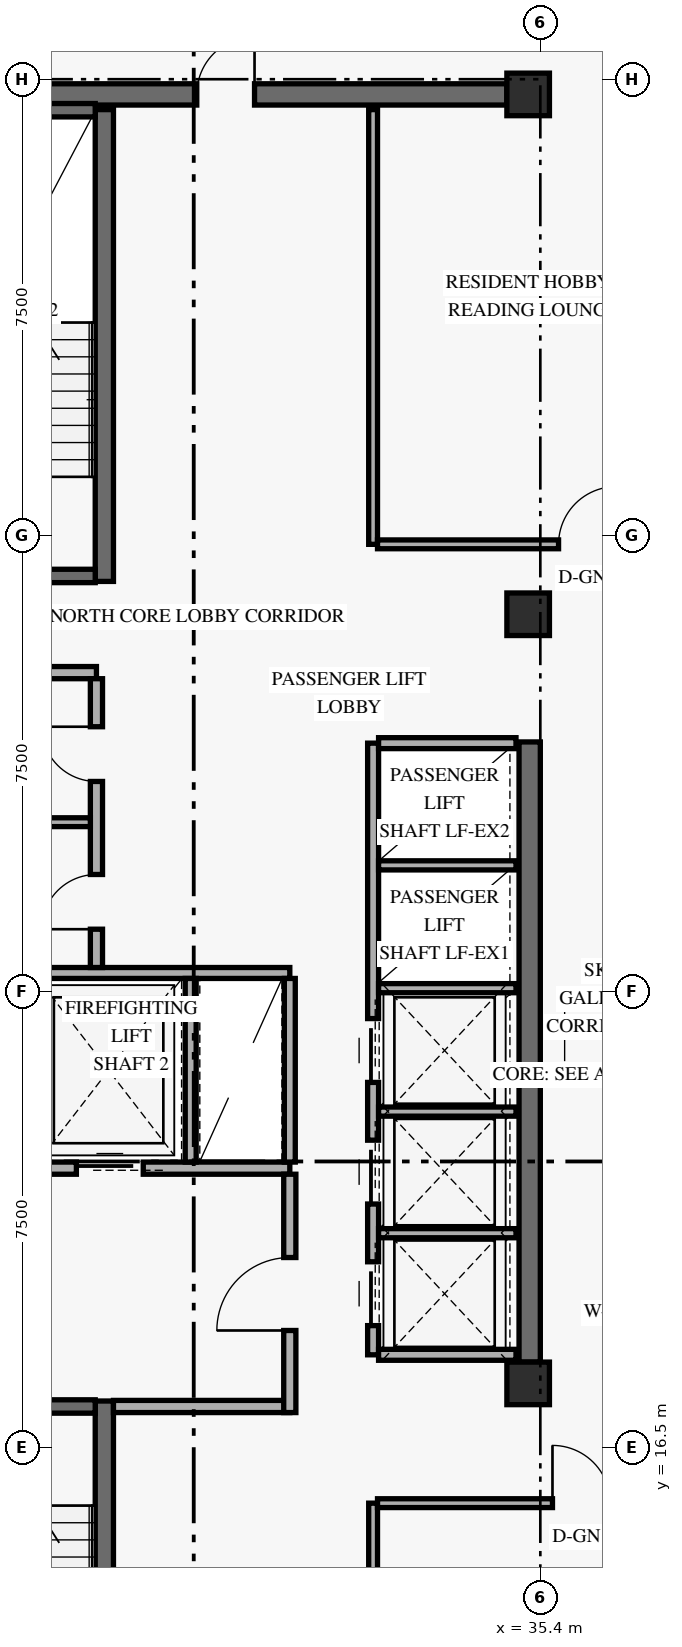
"""IFC4 building model, lengths in metres.
Left out: names, types, materials, properties, quantities, classifications, styles, units other than length and angle.
Written with IfcOpenShell. Run it as: python <this file> out.ifc"""

import sys

from ifc_helpers import new_model, si_unit, direction, frame, frame_2d, origin, origin_2d, place, context, subcontext, project, spatial, rectangle, extrude, element, fill, save


model = new_model("IFC4")
c1 = context("Model", 3, precision=1e-05, world=origin(), true_north=direction((0.0, 1.0)))
c2 = subcontext(c1, "Body", "Model", "MODEL_VIEW")
j1 = project(units=[si_unit("LENGTHUNIT", "METRE"), si_unit("PLANEANGLEUNIT", "RADIAN")], contexts=[c1])
p1 = place(None, origin())
s1 = spatial("IfcSite", under=j1, at=p1, CompositionType="ELEMENT")
p2 = place(p1, origin())
s2 = spatial("IfcBuilding", under=s1, at=p2, CompositionType="ELEMENT")
p3 = place(p2, frame((0.0, 0.0, 274.8)))
s3 = spatial("IfcBuildingStorey", under=s2, at=p3, CompositionType="ELEMENT", Elevation=274.8)
p4 = place(p3, frame((35.225, 17.9, 0.0), z_axis=(0.0, 0.0, 1.0), x_axis=(0.0, 1.0, 0.0)))
e1 = element("IfcWall", 1, at=p4, inside=s3, PredefinedType="SHEAR", context=c2, shape_type="SweptSolid", body=[
    extrude(rectangle(XDim=10.2, YDim=0.35, at=frame_2d((5.1, 0.0))), origin(), (0.0, 0.0, 1.0), 2.821),
])
p5 = place(p3, frame((24.55, 38.75, 0.0), z_axis=(0.0, 0.0, 1.0), x_axis=(1.0, 0.0, 0.0)))
e2 = element("IfcWall", 2, at=p5, inside=s3, PredefinedType="SHEAR", context=c2, shape_type="SweptSolid", body=[
    extrude(rectangle(XDim=10.3, YDim=0.35, at=frame_2d((5.15, 0.0))), origin(), (0.0, 0.0, 1.0), 3.36),
])
p6 = place(p5, frame((5.2, 0.0, 0.0)))
e3 = element("IfcOpeningElement", 3, at=p6, cuts=e2, PredefinedType="OPENING", context=c2, shape_type="SweptSolid", body=[
    extrude(rectangle(XDim=0.95, YDim=2.15, at=frame_2d((0.475, 1.075))), frame((0.0, 0.185, 0.0), z_axis=(0.0, -1.0, 0.0), x_axis=(1.0, 0.0, 0.0)), (0.0, 0.0, 1.0), 0.37),
])
p7 = place(p3, frame((28.23, 9.5, 0.0), z_axis=(0.0, 0.0, 1.0), x_axis=(0.0, 1.0, 0.0)))
e4 = element("IfcWall", 4, at=p7, inside=s3, PredefinedType="SHEAR", context=c2, shape_type="SweptSolid", body=[
    extrude(rectangle(XDim=7.76, YDim=0.3, at=frame_2d((3.88, 0.0))), origin(), (0.0, 0.0, 1.0), 3.36),
])
p8 = place(p3, frame((24.92, 17.17, 0.0), z_axis=(0.0, 0.0, 1.0), x_axis=(1.0, 0.0, 0.0)))
e5 = element("IfcWall", 5, at=p8, inside=s3, PredefinedType="SHEAR", context=c2, shape_type="SweptSolid", body=[
    extrude(rectangle(XDim=3.16, YDim=0.22, at=frame_2d((1.58, 0.0))), origin(), (0.0, 0.0, 1.0), 3.36),
])
p9 = place(p8, frame((0.78, 0.0, 0.0)))
e6 = element("IfcOpeningElement", 6, at=p9, cuts=e5, PredefinedType="OPENING", context=c2, shape_type="SweptSolid", body=[
    extrude(rectangle(XDim=1.05, YDim=2.15, at=frame_2d((0.525, 1.075))), frame((0.0, 0.12, 0.0), z_axis=(0.0, -1.0, 0.0), x_axis=(1.0, 0.0, 0.0)), (0.0, 0.0, 1.0), 0.24),
])
p10 = place(p3, frame((28.23, 30.74, 0.0), z_axis=(0.0, 0.0, 1.0), x_axis=(0.0, 1.0, 0.0)))
e7 = element("IfcWall", 7, at=p10, inside=s3, PredefinedType="SHEAR", context=c2, shape_type="SweptSolid", body=[
    extrude(rectangle(XDim=7.76, YDim=0.3, at=frame_2d((3.88, 0.0))), origin(), (0.0, 0.0, 1.0), 3.36),
])
p11 = place(p3, frame((24.92, 30.83, 0.0), z_axis=(0.0, 0.0, 1.0), x_axis=(1.0, 0.0, 0.0)))
e8 = element("IfcWall", 8, at=p11, inside=s3, PredefinedType="SHEAR", context=c2, shape_type="SweptSolid", body=[
    extrude(rectangle(XDim=3.16, YDim=0.22, at=frame_2d((1.58, 0.0))), origin(), (0.0, 0.0, 1.0), 3.36),
])
p12 = place(p11, frame((0.78, 0.0, 0.0)))
e9 = element("IfcOpeningElement", 9, at=p12, cuts=e8, PredefinedType="OPENING", context=c2, shape_type="SweptSolid", body=[
    extrude(rectangle(XDim=1.05, YDim=2.15, at=frame_2d((0.525, 1.075))), frame((0.0, 0.12, 0.0), z_axis=(0.0, -1.0, 0.0), x_axis=(1.0, 0.0, 0.0)), (0.0, 0.0, 1.0), 0.24),
])
p13 = place(p3, frame((24.92, 38.49, 0.0), z_axis=(0.0, 0.0, 1.0), x_axis=(1.0, 0.0, 0.0)))
e10 = element("IfcWall", 10, at=p13, inside=s3, PredefinedType="SHEAR", context=c2, shape_type="SweptSolid", body=[
    extrude(rectangle(XDim=3.16, YDim=0.22, at=frame_2d((1.58, 0.0))), origin(), (0.0, 0.0, 1.0), 3.36),
])
for number, where, z_axis, x_axis in (
    (11, (35.2, 17.55, 0.0), (0.0, 0.0, 1.0), (1.0, 0.0, 0.0)),
    (12, (35.2, 30.2, 0.0), (0.0, 0.0, 1.0), (1.0, 0.0, 0.0)),
    (13, (35.2, 38.75, 0.0), (0.0, 0.0, 1.0), (1.0, 0.0, 0.0)),
):
    element("IfcColumn", number, at=place(p3, frame(where, z_axis=z_axis, x_axis=x_axis)), inside=s3, PredefinedType="COLUMN", context=c2, shape_type="SweptSolid", body=[
        extrude(rectangle(XDim=0.7, YDim=0.7, at=origin_2d()), origin(), (0.0, 0.0, 1.0), 3.6),
    ])
p14 = place(p3, frame((24.45, 21.09, 0.0), z_axis=(0.0, 0.0, 1.0), x_axis=(1.0, 0.0, 0.0)))
e14 = element("IfcWall", 14, at=p14, inside=s3, PredefinedType="STANDARD", context=c2, shape_type="SweptSolid", body=[
    extrude(rectangle(XDim=6.83, YDim=0.2, at=frame_2d((3.415, 0.0))), origin(), (0.0, 0.0, 1.0), 3.36),
])
p15 = place(p14, frame((0.72, 0.0, 0.0)))
e15 = element("IfcOpeningElement", 15, at=p15, cuts=e14, PredefinedType="OPENING", context=c2, shape_type="SweptSolid", body=[
    extrude(rectangle(XDim=1.1, YDim=2.2, at=frame_2d((0.55, 1.1))), frame((0.0, 0.11, 0.0), z_axis=(0.0, -1.0, 0.0), x_axis=(1.0, 0.0, 0.0)), (0.0, 0.0, 1.0), 0.22),
])
p16 = place(p14, frame((3.32, 0.0, 0.0)))
e16 = element("IfcOpeningElement", 16, at=p16, cuts=e14, PredefinedType="OPENING", context=c2, shape_type="SweptSolid", body=[
    extrude(rectangle(XDim=1.1, YDim=2.2, at=frame_2d((0.55, 1.1))), frame((0.0, 0.11, 0.0), z_axis=(0.0, -1.0, 0.0), x_axis=(1.0, 0.0, 0.0)), (0.0, 0.0, 1.0), 0.22),
])
p17 = place(p3, frame((28.38, 17.17, 0.0), z_axis=(0.0, 0.0, 1.0), x_axis=(1.0, 0.0, 0.0)))
e17 = element("IfcWall", 17, at=p17, inside=s3, PredefinedType="STANDARD", context=c2, shape_type="SweptSolid", body=[
    extrude(rectangle(XDim=2.9, YDim=0.2, at=frame_2d((1.45, 0.0))), origin(), (0.0, 0.0, 1.0), 3.36),
])
p18 = place(p3, frame((31.28, 17.07, 0.0), z_axis=(0.0, 0.0, 1.0), x_axis=(0.0, 1.0, 0.0)))
e18 = element("IfcWall", 18, at=p18, inside=s3, PredefinedType="STANDARD", context=c2, shape_type="SweptSolid", body=[
    extrude(rectangle(XDim=3.92, YDim=0.2, at=frame_2d((1.96, 0.0))), origin(), (0.0, 0.0, 1.0), 2.803),
])
p19 = place(p18, frame((1.35, 0.0, 0.0)))
e19 = element("IfcOpeningElement", 19, at=p19, cuts=e18, PredefinedType="OPENING", context=c2, shape_type="SweptSolid", body=[
    extrude(rectangle(XDim=1.2, YDim=2.15, at=frame_2d((0.6, 1.075))), frame((0.0, 0.11, 0.0), z_axis=(0.0, -1.0, 0.0), x_axis=(1.0, 0.0, 0.0)), (0.0, 0.0, 1.0), 0.22),
])
p20 = place(p3, frame((24.45, 24.3, 0.0), z_axis=(0.0, 0.0, 1.0), x_axis=(1.0, 0.0, 0.0)))
e20 = element("IfcWall", 20, at=p20, inside=s3, PredefinedType="STANDARD", context=c2, shape_type="SweptSolid", body=[
    extrude(rectangle(XDim=6.83, YDim=0.18, at=frame_2d((3.415, 0.0))), origin(), (0.0, 0.0, 1.0), 3.36),
])
for number, where, z_axis, x_axis in (
    (21, (29.65, 21.19, 0.0), (0.0, 0.0, 1.0), (0.0, 1.0, 0.0)),
    (22, (31.28, 21.19, 0.0), (0.0, 0.0, 1.0), (0.0, 1.0, 0.0)),
):
    element("IfcWall", number, at=place(p3, frame(where, z_axis=z_axis, x_axis=x_axis)), inside=s3, PredefinedType="STANDARD", context=c2, shape_type="SweptSolid", body=[
        extrude(rectangle(XDim=3.02, YDim=0.18, at=frame_2d((1.51, 0.0))), origin(), (0.0, 0.0, 1.0), 3.36),
    ])
p21 = place(p3, frame((24.45, 29.24, 0.0), z_axis=(0.0, 0.0, 1.0), x_axis=(1.0, 0.0, 0.0)))
e23 = element("IfcWall", 23, at=p21, inside=s3, PredefinedType="STANDARD", context=c2, shape_type="SweptSolid", body=[
    extrude(rectangle(XDim=3.65, YDim=0.2, at=frame_2d((1.825, 0.0))), origin(), (0.0, 0.0, 1.0), 3.36),
])
p22 = place(p3, frame((28.1, 24.39, 0.0), z_axis=(0.0, 0.0, 1.0), x_axis=(0.0, 1.0, 0.0)))
e24 = element("IfcWall", 24, at=p22, inside=s3, PredefinedType="STANDARD", context=c2, shape_type="SweptSolid", body=[
    extrude(rectangle(XDim=4.75, YDim=0.2, at=frame_2d((2.375, 0.0))), origin(), (0.0, 0.0, 1.0), 3.36),
])
p23 = place(p22, frame((0.63, 0.0, 0.0)))
e25 = element("IfcOpeningElement", 25, at=p23, cuts=e24, PredefinedType="OPENING", context=c2, shape_type="SweptSolid", body=[
    extrude(rectangle(XDim=0.9, YDim=2.1, at=frame_2d((0.45, 1.05))), frame((0.0, 0.11, 0.0), z_axis=(0.0, -1.0, 0.0), x_axis=(1.0, 0.0, 0.0)), (0.0, 0.0, 1.0), 0.22),
])
p24 = place(p22, frame((3.06, 0.0, 0.0)))
e26 = element("IfcOpeningElement", 26, at=p24, cuts=e24, PredefinedType="OPENING", context=c2, shape_type="SweptSolid", body=[
    extrude(rectangle(XDim=0.9, YDim=2.1, at=frame_2d((0.45, 1.05))), frame((0.0, 0.11, 0.0), z_axis=(0.0, -1.0, 0.0), x_axis=(1.0, 0.0, 0.0)), (0.0, 0.0, 1.0), 0.22),
])
p25 = place(p3, frame((24.45, 26.78, 0.0), z_axis=(0.0, 0.0, 1.0), x_axis=(1.0, 0.0, 0.0)))
e27 = element("IfcWall", 27, at=p25, inside=s3, PredefinedType="PARTITIONING", context=c2, shape_type="SweptSolid", body=[
    extrude(rectangle(XDim=3.55, YDim=0.145, at=frame_2d((1.775, 0.0))), origin(), (0.0, 0.0, 1.0), 3.36),
])
p26 = place(p3, frame((32.65, 18.02, 0.0), z_axis=(0.0, 0.0, 1.0), x_axis=(0.0, 1.0, 0.0)))
e28 = element("IfcWall", 28, at=p26, inside=s3, PredefinedType="STANDARD", context=c2, shape_type="SweptSolid", body=[
    extrude(rectangle(XDim=10.06, YDim=0.18, at=frame_2d((5.03, 0.0))), origin(), (0.0, 0.0, 1.0), 3.36),
])
p27 = place(p26, frame((0.48, 0.0, 0.0)))
e29 = element("IfcOpeningElement", 29, at=p27, cuts=e28, PredefinedType="OPENING", context=c2, shape_type="SweptSolid", body=[
    extrude(rectangle(XDim=1.05, YDim=2.2, at=frame_2d((0.525, 1.1))), frame((0.0, 0.1, 0.0), z_axis=(0.0, -1.0, 0.0), x_axis=(1.0, 0.0, 0.0)), (0.0, 0.0, 1.0), 0.2),
])
p28 = place(p26, frame((2.48, 0.0, 0.0)))
e30 = element("IfcOpeningElement", 30, at=p28, cuts=e28, PredefinedType="OPENING", context=c2, shape_type="SweptSolid", body=[
    extrude(rectangle(XDim=1.05, YDim=2.2, at=frame_2d((0.525, 1.1))), frame((0.0, 0.1, 0.0), z_axis=(0.0, -1.0, 0.0), x_axis=(1.0, 0.0, 0.0)), (0.0, 0.0, 1.0), 0.2),
])
p29 = place(p26, frame((4.48, 0.0, 0.0)))
e31 = element("IfcOpeningElement", 31, at=p29, cuts=e28, PredefinedType="OPENING", context=c2, shape_type="SweptSolid", body=[
    extrude(rectangle(XDim=1.05, YDim=2.2, at=frame_2d((0.525, 1.1))), frame((0.0, 0.1, 0.0), z_axis=(0.0, -1.0, 0.0), x_axis=(1.0, 0.0, 0.0)), (0.0, 0.0, 1.0), 0.2),
])
for number, where, z_axis, x_axis in (
    (32, (32.74, 18.02, 0.0), (0.0, 0.0, 1.0), (1.0, 0.0, 0.0)),
    (33, (32.74, 28.08, 0.0), (0.0, 0.0, 1.0), (1.0, 0.0, 0.0)),
):
    element("IfcWall", number, at=place(p3, frame(where, z_axis=z_axis, x_axis=x_axis)), inside=s3, PredefinedType="STANDARD", context=c2, shape_type="SweptSolid", body=[
        extrude(rectangle(XDim=2.26, YDim=0.18, at=frame_2d((1.13, 0.0))), origin(), (0.0, 0.0, 1.0), 3.36),
    ])
for number, where, z_axis, x_axis in (
    (34, (32.74, 20.02, 0.0), (0.0, 0.0, 1.0), (1.0, 0.0, 0.0)),
    (35, (32.74, 22.02, 0.0), (0.0, 0.0, 1.0), (1.0, 0.0, 0.0)),
    (36, (32.74, 24.05, 0.0), (0.0, 0.0, 1.0), (1.0, 0.0, 0.0)),
    (37, (32.74, 26.07, 0.0), (0.0, 0.0, 1.0), (1.0, 0.0, 0.0)),
):
    element("IfcWall", number, at=place(p3, frame(where, z_axis=z_axis, x_axis=x_axis)), inside=s3, PredefinedType="STANDARD", context=c2, shape_type="SweptSolid", body=[
        extrude(rectangle(XDim=2.26, YDim=0.15, at=frame_2d((1.13, 0.0))), origin(), (0.0, 0.0, 1.0), 3.36),
    ])
p30 = place(p3, frame((32.65, 9.5, 0.0), z_axis=(0.0, 0.0, 1.0), x_axis=(0.0, 1.0, 0.0)))
e38 = element("IfcWall", 38, at=p30, inside=s3, PredefinedType="PARTITIONING", context=c2, shape_type="SweptSolid", body=[
    extrude(rectangle(XDim=6.08, YDim=0.145, at=frame_2d((3.04, 0.0))), origin(), (0.0, 0.0, 1.0), 3.36),
])
p31 = place(p3, frame((32.722, 15.58, 0.0), z_axis=(0.0, 0.0, 1.0), x_axis=(1.0, 0.0, 0.0)))
e39 = element("IfcWall", 39, at=p31, inside=s3, PredefinedType="PARTITIONING", context=c2, shape_type="SweptSolid", body=[
    extrude(rectangle(XDim=5.228, YDim=0.145, at=frame_2d((2.614, 0.0))), origin(), (0.0, 0.0, 1.0), 2.803),
])
p32 = place(p31, frame((2.877, 0.0, 0.0)))
e40 = element("IfcOpeningElement", 40, at=p32, cuts=e39, PredefinedType="OPENING", context=c2, shape_type="SweptSolid", body=[
    extrude(rectangle(XDim=0.95, YDim=2.15, at=frame_2d((0.475, 1.075))), frame((0.0, 0.083, 0.0), z_axis=(0.0, -1.0, 0.0), x_axis=(1.0, 0.0, 0.0)), (0.0, 0.0, 1.0), 0.165),
])
p33 = place(p3, frame((32.65, 31.35, 0.0), z_axis=(0.0, 0.0, 1.0), x_axis=(0.0, 1.0, 0.0)))
e41 = element("IfcWall", 41, at=p33, inside=s3, PredefinedType="PARTITIONING", context=c2, shape_type="SweptSolid", body=[
    extrude(rectangle(XDim=7.15, YDim=0.145, at=frame_2d((3.575, 0.0))), origin(), (0.0, 0.0, 1.0), 3.36),
])
p34 = place(p3, frame((32.722, 31.35, 0.0), z_axis=(0.0, 0.0, 1.0), x_axis=(1.0, 0.0, 0.0)))
e42 = element("IfcWall", 42, at=p34, inside=s3, PredefinedType="PARTITIONING", context=c2, shape_type="SweptSolid", body=[
    extrude(rectangle(XDim=5.778, YDim=0.145, at=frame_2d((2.889, 0.0))), origin(), (0.0, 0.0, 1.0), 2.803),
])
p35 = place(p34, frame((2.978, 0.0, 0.0)))
e43 = element("IfcOpeningElement", 43, at=p35, cuts=e42, PredefinedType="OPENING", context=c2, shape_type="SweptSolid", body=[
    extrude(rectangle(XDim=0.95, YDim=2.15, at=frame_2d((0.475, 1.075))), frame((0.0, 0.083, 0.0), z_axis=(0.0, -1.0, 0.0), x_axis=(1.0, 0.0, 0.0)), (0.0, 0.0, 1.0), 0.165),
])
p36 = place(p16, origin())
e44 = element("IfcDoor", 44, at=p36, inside=s3, OperationType="SLIDING_TO_LEFT", PredefinedType="DOOR", context=c2, shape_type="SweptSolid", body=[
    extrude(rectangle(XDim=1.1, YDim=2.2, at=frame_2d((0.55, 1.1))), frame((0.0, 0.025, 0.0), z_axis=(0.0, -1.0, 0.0), x_axis=(1.0, 0.0, 0.0)), (0.0, 0.0, 1.0), 0.05),
])
fill(e16, e44)
p37 = place(p19, origin())
e45 = element("IfcDoor", 45, at=p37, inside=s3, OperationType="SINGLE_SWING_LEFT", PredefinedType="DOOR", context=c2, shape_type="SweptSolid", body=[
    extrude(rectangle(XDim=1.2, YDim=2.15, at=frame_2d((0.6, 1.075))), frame((0.0, 0.025, 0.0), z_axis=(0.0, -1.0, 0.0), x_axis=(1.0, 0.0, 0.0)), (0.0, 0.0, 1.0), 0.05),
])
fill(e19, e45)
p38 = place(p23, origin())
e46 = element("IfcDoor", 46, at=p38, inside=s3, OperationType="SINGLE_SWING_LEFT", PredefinedType="DOOR", context=c2, shape_type="SweptSolid", body=[
    extrude(rectangle(XDim=0.9, YDim=2.1, at=frame_2d((0.45, 1.05))), frame((0.0, 0.025, 0.0), z_axis=(0.0, -1.0, 0.0), x_axis=(1.0, 0.0, 0.0)), (0.0, 0.0, 1.0), 0.05),
])
fill(e25, e46)
p39 = place(p24, origin())
e47 = element("IfcDoor", 47, at=p39, inside=s3, OperationType="SINGLE_SWING_RIGHT", PredefinedType="DOOR", context=c2, shape_type="SweptSolid", body=[
    extrude(rectangle(XDim=0.9, YDim=2.1, at=frame_2d((0.45, 1.05))), frame((0.0, 0.025, 0.0), z_axis=(0.0, -1.0, 0.0), x_axis=(1.0, 0.0, 0.0)), (0.0, 0.0, 1.0), 0.05),
])
fill(e26, e47)
p40 = place(p27, origin())
e48 = element("IfcDoor", 48, at=p40, inside=s3, OperationType="SLIDING_TO_LEFT", PredefinedType="DOOR", context=c2, shape_type="SweptSolid", body=[
    extrude(rectangle(XDim=1.05, YDim=2.2, at=frame_2d((0.525, 1.1))), frame((0.0, 0.025, 0.0), z_axis=(0.0, -1.0, 0.0), x_axis=(1.0, 0.0, 0.0)), (0.0, 0.0, 1.0), 0.05),
])
fill(e29, e48)
p41 = place(p28, origin())
e49 = element("IfcDoor", 49, at=p41, inside=s3, OperationType="SLIDING_TO_LEFT", PredefinedType="DOOR", context=c2, shape_type="SweptSolid", body=[
    extrude(rectangle(XDim=1.05, YDim=2.2, at=frame_2d((0.525, 1.1))), frame((0.0, 0.025, 0.0), z_axis=(0.0, -1.0, 0.0), x_axis=(1.0, 0.0, 0.0)), (0.0, 0.0, 1.0), 0.05),
])
fill(e30, e49)
p42 = place(p29, origin())
e50 = element("IfcDoor", 50, at=p42, inside=s3, OperationType="SLIDING_TO_LEFT", PredefinedType="DOOR", context=c2, shape_type="SweptSolid", body=[
    extrude(rectangle(XDim=1.05, YDim=2.2, at=frame_2d((0.525, 1.1))), frame((0.0, 0.025, 0.0), z_axis=(0.0, -1.0, 0.0), x_axis=(1.0, 0.0, 0.0)), (0.0, 0.0, 1.0), 0.05),
])
fill(e31, e50)
p43 = place(p32, origin())
e51 = element("IfcDoor", 51, at=p43, inside=s3, OperationType="SINGLE_SWING_LEFT", PredefinedType="DOOR", context=c2, shape_type="SweptSolid", body=[
    extrude(rectangle(XDim=0.95, YDim=2.15, at=frame_2d((0.475, 1.075))), frame((0.0, 0.025, 0.0), z_axis=(0.0, -1.0, 0.0), x_axis=(1.0, 0.0, 0.0)), (0.0, 0.0, 1.0), 0.05),
])
fill(e40, e51)
p44 = place(p35, origin())
e52 = element("IfcDoor", 52, at=p44, inside=s3, OperationType="SINGLE_SWING_RIGHT", PredefinedType="DOOR", context=c2, shape_type="SweptSolid", body=[
    extrude(rectangle(XDim=0.95, YDim=2.15, at=frame_2d((0.475, 1.075))), frame((0.0, 0.025, 0.0), z_axis=(0.0, -1.0, 0.0), x_axis=(1.0, 0.0, 0.0)), (0.0, 0.0, 1.0), 0.05),
])
fill(e43, e52)
p45 = place(p6, origin())
e53 = element("IfcDoor", 53, at=p45, inside=s3, OperationType="SINGLE_SWING_RIGHT", PredefinedType="DOOR", context=c2, shape_type="SweptSolid", body=[
    extrude(rectangle(XDim=0.95, YDim=2.15, at=frame_2d((0.475, 1.075))), frame((0.0, 0.025, 0.0), z_axis=(0.0, -1.0, 0.0), x_axis=(1.0, 0.0, 0.0)), (0.0, 0.0, 1.0), 0.05),
])
fill(e3, e53)
save(model, sys.argv[1])
